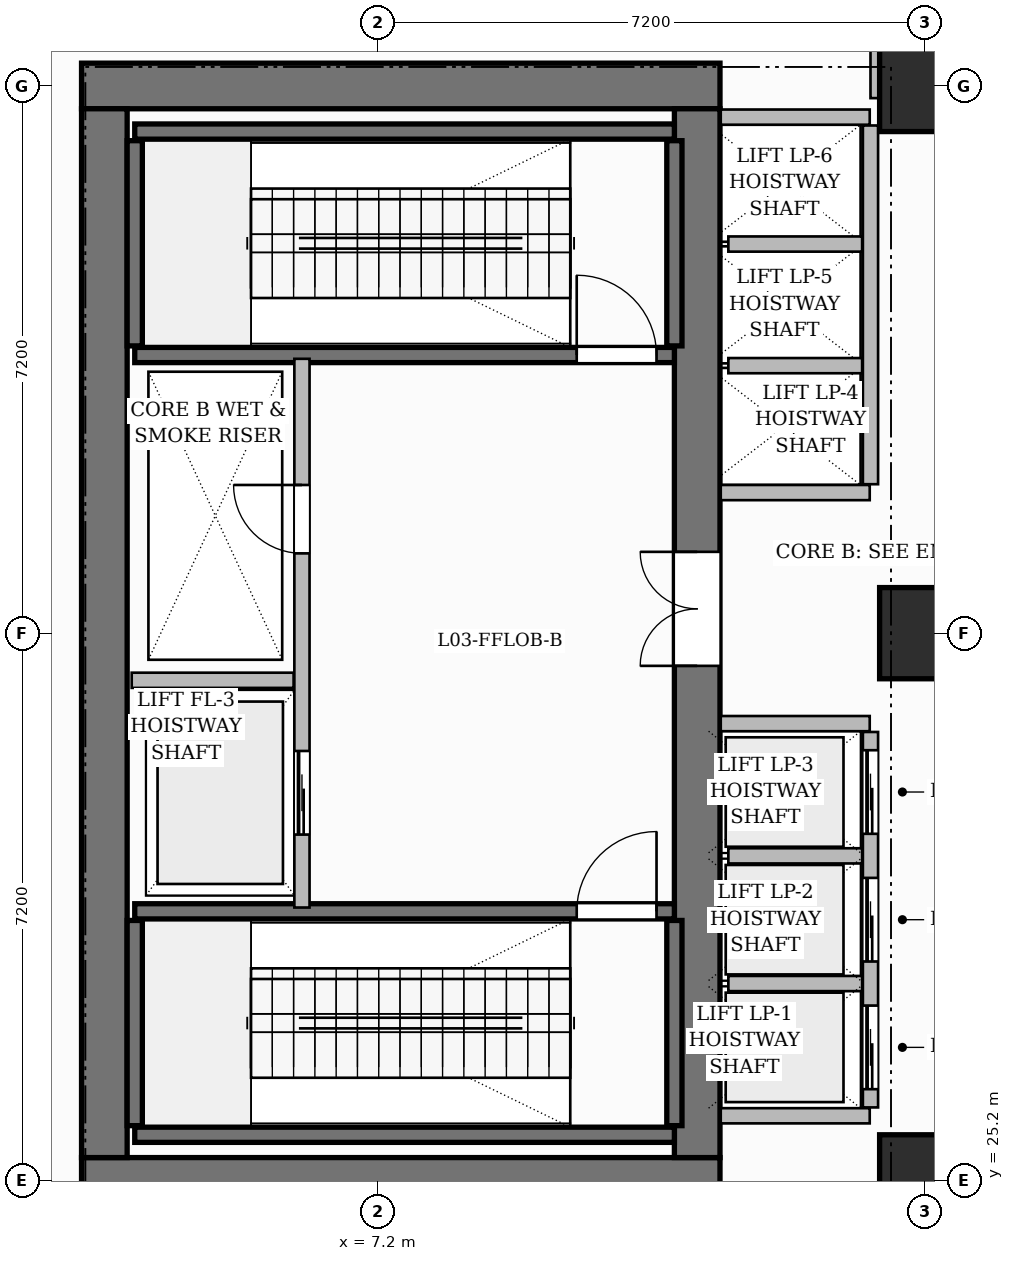
"""IFC4 building model, lengths in metres.
Left out: names, types, materials, properties, quantities, classifications, styles, units other than length and angle.
Written with IfcOpenShell. Run it as: python <this file> out.ifc"""

import sys

from ifc_helpers import new_model, si_unit, direction, frame, frame_2d, origin, origin_2d, place, context, subcontext, project, spatial, rectangle, extrude, source, transform, mapped, element, fill, save


model = new_model("IFC4")
c1 = context("Model", 3, precision=1e-05, world=origin(), true_north=direction((0.0, 1.0)))
c2 = subcontext(c1, "Body", "Model", "MODEL_VIEW")
j1 = project(units=[si_unit("LENGTHUNIT", "METRE"), si_unit("PLANEANGLEUNIT", "RADIAN")], contexts=[c1])
p1 = place(None, origin())
s1 = spatial("IfcSite", under=j1, at=p1, CompositionType="ELEMENT")
p2 = place(p1, origin())
s2 = spatial("IfcBuilding", under=s1, at=p2, CompositionType="ELEMENT")
p3 = place(p2, frame((0.0, 0.0, 16.2)))
s3 = spatial("IfcBuildingStorey", under=s2, at=p3, CompositionType="ELEMENT", Elevation=16.2)
for number, where, z_axis, x_axis in (
    (1, (3.3, 25.2, 0.0), (0.0, 0.0, 1.0), (1.0, 0.0, 0.0)),
    (2, (3.3, 39.6, 0.0), (0.0, 0.0, 1.0), (1.0, 0.0, 0.0)),
):
    element("IfcWall", number, at=place(p3, frame(where, z_axis=z_axis, x_axis=x_axis)), inside=s3, PredefinedType="SHEAR", context=c2, shape_type="SweptSolid", body=[
        extrude(rectangle(XDim=8.4, YDim=0.6, at=frame_2d((4.2, 0.0))), origin(), (0.0, 0.0, 1.0), 5.4),
    ])
p4 = place(p3, frame((3.6, 25.5, 0.0), z_axis=(0.0, 0.0, 1.0), x_axis=(0.0, 1.0, 0.0)))
e3 = element("IfcWall", 3, at=p4, inside=s3, PredefinedType="SHEAR", context=c2, shape_type="SweptSolid", body=[
    extrude(rectangle(XDim=13.8, YDim=0.6, at=frame_2d((6.9, 0.0))), origin(), (0.0, 0.0, 1.0), 5.4),
])
p5 = place(p3, frame((11.4, 25.5, 0.0), z_axis=(0.0, 0.0, 1.0), x_axis=(0.0, 1.0, 0.0)))
e4 = element("IfcWall", 4, at=p5, inside=s3, PredefinedType="SHEAR", context=c2, shape_type="SweptSolid", body=[
    extrude(rectangle(XDim=13.8, YDim=0.6, at=frame_2d((6.9, 0.0))), origin(), (0.0, 0.0, 1.0), 5.4),
])
p6 = place(p5, frame((6.47, 0.0, 0.0)))
e5 = element("IfcOpeningElement", 5, at=p6, cuts=e4, PredefinedType="OPENING", context=c2, shape_type="SweptSolid", body=[
    extrude(rectangle(XDim=1.5, YDim=2.2, at=frame_2d((0.75, 1.1))), frame((0.0, 0.31, 0.0), z_axis=(0.0, -1.0, 0.0), x_axis=(1.0, 0.0, 0.0)), (0.0, 0.0, 1.0), 0.62),
])
m1 = source(origin(), c2, "Body", "SweptSolid", [
    extrude(rectangle(XDim=1.2, YDim=1.2, at=origin_2d()), origin(), (0.0, 0.0, 1.0), 5.4),
])
for number, where, z_axis, x_axis in (
    (6, (14.4, 25.2, 0.0), (0.0, 0.0, 1.0), (1.0, 0.0, 0.0)),
    (7, (14.4, 32.4, 0.0), (0.0, 0.0, 1.0), (1.0, 0.0, 0.0)),
    (8, (14.4, 39.6, 0.0), (0.0, 0.0, 1.0), (1.0, 0.0, 0.0)),
):
    element("IfcColumn", number, at=place(p3, frame(where, z_axis=z_axis, x_axis=x_axis)), inside=s3, PredefinedType="COLUMN", context=c2, shape_type="MappedRepresentation", body=[
        mapped(m1, transform((0.0, 0.0, 0.0), scale=1.0)),
    ])
p7 = place(p3, frame((4.0, 25.8, 0.0), z_axis=(0.0, 0.0, 1.0), x_axis=(1.0, 0.0, 0.0)))
e9 = element("IfcWall", 9, at=p7, inside=s3, PredefinedType="SHEAR", context=c2, shape_type="SweptSolid", body=[
    extrude(rectangle(XDim=7.1, YDim=0.2, at=frame_2d((3.55, 0.0))), origin(), (0.0, 0.0, 1.0), 5.4),
])
for number, where, z_axis, x_axis in (
    (10, (4.0, 25.92, 0.0), (0.0, 0.0, 1.0), (0.0, 1.0, 0.0)),
    (11, (11.1, 25.92, 0.0), (0.0, 0.0, 1.0), (0.0, 1.0, 0.0)),
):
    element("IfcWall", number, at=place(p3, frame(where, z_axis=z_axis, x_axis=x_axis)), inside=s3, PredefinedType="SHEAR", context=c2, shape_type="SweptSolid", body=[
        extrude(rectangle(XDim=2.7, YDim=0.2, at=frame_2d((1.35, 0.0))), origin(), (0.0, 0.0, 1.0), 5.4),
    ])
p8 = place(p3, frame((4.0, 28.74, 0.0), z_axis=(0.0, 0.0, 1.0), x_axis=(1.0, 0.0, 0.0)))
e12 = element("IfcWall", 12, at=p8, inside=s3, PredefinedType="SHEAR", context=c2, shape_type="SweptSolid", body=[
    extrude(rectangle(XDim=7.1, YDim=0.2, at=frame_2d((3.55, 0.0))), origin(), (0.0, 0.0, 1.0), 5.4),
])
p9 = place(p8, frame((5.815, 0.0, 0.0)))
e13 = element("IfcOpeningElement", 13, at=p9, cuts=e12, PredefinedType="OPENING", context=c2, shape_type="SweptSolid", body=[
    extrude(rectangle(XDim=1.05, YDim=2.2, at=frame_2d((0.525, 1.1))), frame((0.0, 0.11, 0.0), z_axis=(0.0, -1.0, 0.0), x_axis=(1.0, 0.0, 0.0)), (0.0, 0.0, 1.0), 0.22),
])
p10 = place(p3, frame((4.0, 39.0, 0.0), z_axis=(0.0, 0.0, 1.0), x_axis=(1.0, 0.0, 0.0)))
e14 = element("IfcWall", 14, at=p10, inside=s3, PredefinedType="SHEAR", context=c2, shape_type="SweptSolid", body=[
    extrude(rectangle(XDim=7.1, YDim=0.2, at=frame_2d((3.55, 0.0))), origin(), (0.0, 0.0, 1.0), 5.4),
])
for number, where, z_axis, x_axis in (
    (15, (4.0, 36.18, 0.0), (0.0, 0.0, 1.0), (0.0, 1.0, 0.0)),
    (16, (11.1, 36.18, 0.0), (0.0, 0.0, 1.0), (0.0, 1.0, 0.0)),
):
    element("IfcWall", number, at=place(p3, frame(where, z_axis=z_axis, x_axis=x_axis)), inside=s3, PredefinedType="SHEAR", context=c2, shape_type="SweptSolid", body=[
        extrude(rectangle(XDim=2.7, YDim=0.2, at=frame_2d((1.35, 0.0))), origin(), (0.0, 0.0, 1.0), 5.4),
    ])
p11 = place(p3, frame((4.0, 36.06, 0.0), z_axis=(0.0, 0.0, 1.0), x_axis=(1.0, 0.0, 0.0)))
e17 = element("IfcWall", 17, at=p11, inside=s3, PredefinedType="SHEAR", context=c2, shape_type="SweptSolid", body=[
    extrude(rectangle(XDim=7.1, YDim=0.2, at=frame_2d((3.55, 0.0))), origin(), (0.0, 0.0, 1.0), 5.4),
])
p12 = place(p11, frame((5.815, 0.0, 0.0)))
e18 = element("IfcOpeningElement", 18, at=p12, cuts=e17, PredefinedType="OPENING", context=c2, shape_type="SweptSolid", body=[
    extrude(rectangle(XDim=1.05, YDim=2.2, at=frame_2d((0.525, 1.1))), frame((0.0, 0.11, 0.0), z_axis=(0.0, -1.0, 0.0), x_axis=(1.0, 0.0, 0.0)), (0.0, 0.0, 1.0), 0.22),
])
p13 = place(p3, frame((6.2, 28.79, 0.0), z_axis=(0.0, 0.0, 1.0), x_axis=(0.0, 1.0, 0.0)))
e19 = element("IfcWall", 19, at=p13, inside=s3, PredefinedType="PARTITIONING", context=c2, shape_type="SweptSolid", body=[
    extrude(rectangle(XDim=7.22, YDim=0.2, at=frame_2d((3.61, 0.0))), origin(), (0.0, 0.0, 1.0), 5.1),
])
p14 = place(p13, frame((4.66, 0.0, 0.0)))
e20 = element("IfcOpeningElement", 20, at=p14, cuts=e19, PredefinedType="OPENING", context=c2, shape_type="SweptSolid", body=[
    extrude(rectangle(XDim=0.9, YDim=2.1, at=frame_2d((0.45, 1.05))), frame((0.0, 0.11, 0.0), z_axis=(0.0, -1.0, 0.0), x_axis=(1.0, 0.0, 0.0)), (0.0, 0.0, 1.0), 0.22),
])
p15 = place(p13, frame((0.96, 0.0, 0.0)))
e21 = element("IfcOpeningElement", 21, at=p15, cuts=e19, PredefinedType="OPENING", context=c2, shape_type="SweptSolid", body=[
    extrude(rectangle(XDim=1.1, YDim=2.2, at=frame_2d((0.55, 1.1))), frame((0.0, 0.11, 0.0), z_axis=(0.0, -1.0, 0.0), x_axis=(1.0, 0.0, 0.0)), (0.0, 0.0, 1.0), 0.22),
])
p16 = place(p3, frame((3.96, 31.78, 0.0), z_axis=(0.0, 0.0, 1.0), x_axis=(1.0, 0.0, 0.0)))
e22 = element("IfcWall", 22, at=p16, inside=s3, PredefinedType="PARTITIONING", context=c2, shape_type="SweptSolid", body=[
    extrude(rectangle(XDim=2.13, YDim=0.2, at=frame_2d((1.065, 0.0))), origin(), (0.0, 0.0, 1.0), 5.1),
])
for number, where, z_axis, x_axis in (
    (23, (11.71, 26.05, 0.0), (0.0, 0.0, 1.0), (1.0, 0.0, 0.0)),
    (24, (11.71, 31.21, 0.0), (0.0, 0.0, 1.0), (1.0, 0.0, 0.0)),
):
    element("IfcWall", number, at=place(p3, frame(where, z_axis=z_axis, x_axis=x_axis)), inside=s3, PredefinedType="PARTITIONING", context=c2, shape_type="SweptSolid", body=[
        extrude(rectangle(XDim=1.96, YDim=0.2, at=frame_2d((0.98, 0.0))), origin(), (0.0, 0.0, 1.0), 5.1),
    ])
p17 = place(p3, frame((13.68, 26.16, 0.0), z_axis=(0.0, 0.0, 1.0), x_axis=(0.0, 1.0, 0.0)))
e25 = element("IfcWall", 25, at=p17, inside=s3, PredefinedType="PARTITIONING", context=c2, shape_type="SweptSolid", body=[
    extrude(rectangle(XDim=4.94, YDim=0.2, at=frame_2d((2.47, 0.0))), origin(), (0.0, 0.0, 1.0), 5.1),
])
p18 = place(p17, frame((0.24, 0.0, 0.0)))
e26 = element("IfcOpeningElement", 26, at=p18, cuts=e25, PredefinedType="OPENING", context=c2, shape_type="SweptSolid", body=[
    extrude(rectangle(XDim=1.1, YDim=2.2, at=frame_2d((0.55, 1.1))), frame((0.0, 0.11, 0.0), z_axis=(0.0, -1.0, 0.0), x_axis=(1.0, 0.0, 0.0)), (0.0, 0.0, 1.0), 0.22),
])
p19 = place(p17, frame((1.92, 0.0, 0.0)))
e27 = element("IfcOpeningElement", 27, at=p19, cuts=e25, PredefinedType="OPENING", context=c2, shape_type="SweptSolid", body=[
    extrude(rectangle(XDim=1.1, YDim=2.2, at=frame_2d((0.55, 1.1))), frame((0.0, 0.11, 0.0), z_axis=(0.0, -1.0, 0.0), x_axis=(1.0, 0.0, 0.0)), (0.0, 0.0, 1.0), 0.22),
])
p20 = place(p17, frame((3.6, 0.0, 0.0)))
e28 = element("IfcOpeningElement", 28, at=p20, cuts=e25, PredefinedType="OPENING", context=c2, shape_type="SweptSolid", body=[
    extrude(rectangle(XDim=1.1, YDim=2.2, at=frame_2d((0.55, 1.1))), frame((0.0, 0.11, 0.0), z_axis=(0.0, -1.0, 0.0), x_axis=(1.0, 0.0, 0.0)), (0.0, 0.0, 1.0), 0.22),
])
for number, where, z_axis, x_axis in (
    (29, (11.81, 27.79, 0.0), (0.0, 0.0, 1.0), (1.0, 0.0, 0.0)),
    (30, (11.81, 29.47, 0.0), (0.0, 0.0, 1.0), (1.0, 0.0, 0.0)),
):
    element("IfcWall", number, at=place(p3, frame(where, z_axis=z_axis, x_axis=x_axis)), inside=s3, PredefinedType="PARTITIONING", context=c2, shape_type="SweptSolid", body=[
        extrude(rectangle(XDim=1.76, YDim=0.2, at=frame_2d((0.88, 0.0))), origin(), (0.0, 0.0, 1.0), 5.1),
    ])
for number, where, z_axis, x_axis in (
    (31, (11.71, 34.25, 0.0), (0.0, 0.0, 1.0), (1.0, 0.0, 0.0)),
    (32, (11.71, 39.19, 0.0), (0.0, 0.0, 1.0), (1.0, 0.0, 0.0)),
):
    element("IfcWall", number, at=place(p3, frame(where, z_axis=z_axis, x_axis=x_axis)), inside=s3, PredefinedType="PARTITIONING", context=c2, shape_type="SweptSolid", body=[
        extrude(rectangle(XDim=1.96, YDim=0.2, at=frame_2d((0.98, 0.0))), origin(), (0.0, 0.0, 1.0), 5.1),
    ])
p21 = place(p3, frame((13.68, 34.36, 0.0), z_axis=(0.0, 0.0, 1.0), x_axis=(0.0, 1.0, 0.0)))
e33 = element("IfcWall", 33, at=p21, inside=s3, PredefinedType="PARTITIONING", context=c2, shape_type="SweptSolid", body=[
    extrude(rectangle(XDim=4.72, YDim=0.2, at=frame_2d((2.36, 0.0))), origin(), (0.0, 0.0, 1.0), 5.1),
])
for number, where, z_axis, x_axis in (
    (34, (11.81, 35.92, 0.0), (0.0, 0.0, 1.0), (1.0, 0.0, 0.0)),
    (35, (11.81, 37.52, 0.0), (0.0, 0.0, 1.0), (1.0, 0.0, 0.0)),
):
    element("IfcWall", number, at=place(p3, frame(where, z_axis=z_axis, x_axis=x_axis)), inside=s3, PredefinedType="PARTITIONING", context=c2, shape_type="SweptSolid", body=[
        extrude(rectangle(XDim=1.76, YDim=0.2, at=frame_2d((0.88, 0.0))), origin(), (0.0, 0.0, 1.0), 5.1),
    ])
p22 = place(p3, frame((13.75, 39.44, 0.0), z_axis=(0.0, 0.0, 1.0), x_axis=(0.0, 1.0, 0.0)))
e36 = element("IfcWall", 36, at=p22, inside=s3, PredefinedType="PARTITIONING", context=c2, shape_type="SweptSolid", body=[
    extrude(rectangle(XDim=7.192, YDim=0.14, at=frame_2d((3.596, 0.0))), origin(), (0.0, 0.0, 1.0), 5.1),
])
p23 = place(p3, frame((13.84, 39.35, 0.0), z_axis=(0.0, 0.0, 1.0), x_axis=(1.0, 0.0, 0.0)))
e37 = element("IfcWall", 37, at=p23, inside=s3, PredefinedType="PARTITIONING", context=c2, shape_type="SweptSolid", body=[
    extrude(rectangle(XDim=58.52, YDim=0.16, at=frame_2d((29.26, 0.0))), origin(), (0.0, 0.0, 1.0), 4.185),
])
p24 = place(p23, frame((10.535, 0.0, 0.0)))
e38 = element("IfcOpeningElement", 38, at=p24, cuts=e37, PredefinedType="OPENING", context=c2, shape_type="SweptSolid", body=[
    extrude(rectangle(XDim=1.6, YDim=2.4, at=frame_2d((0.8, 1.2))), frame((0.0, 0.09, 0.0), z_axis=(0.0, -1.0, 0.0), x_axis=(1.0, 0.0, 0.0)), (0.0, 0.0, 1.0), 0.18),
])
p25 = place(p23, frame((30.66, 0.0, 0.0)))
e39 = element("IfcOpeningElement", 39, at=p25, cuts=e37, PredefinedType="OPENING", context=c2, shape_type="SweptSolid", body=[
    extrude(rectangle(XDim=1.6, YDim=2.4, at=frame_2d((0.8, 1.2))), frame((0.0, 0.09, 0.0), z_axis=(0.0, -1.0, 0.0), x_axis=(1.0, 0.0, 0.0)), (0.0, 0.0, 1.0), 0.18),
])
p26 = place(p23, frame((44.235, 0.0, 0.0)))
e40 = element("IfcOpeningElement", 40, at=p26, cuts=e37, PredefinedType="OPENING", context=c2, shape_type="SweptSolid", body=[
    extrude(rectangle(XDim=0.85, YDim=2.1, at=frame_2d((0.425, 1.05))), frame((0.0, 0.09, 0.0), z_axis=(0.0, -1.0, 0.0), x_axis=(1.0, 0.0, 0.0)), (0.0, 0.0, 1.0), 0.18),
])
p27 = place(p23, frame((50.335, 0.0, 0.0)))
e41 = element("IfcOpeningElement", 41, at=p27, cuts=e37, PredefinedType="OPENING", context=c2, shape_type="SweptSolid", body=[
    extrude(rectangle(XDim=0.85, YDim=2.1, at=frame_2d((0.425, 1.05))), frame((0.0, 0.09, 0.0), z_axis=(0.0, -1.0, 0.0), x_axis=(1.0, 0.0, 0.0)), (0.0, 0.0, 1.0), 0.18),
])
p28 = place(p23, frame((54.685, 0.0, 0.0)))
e42 = element("IfcOpeningElement", 42, at=p28, cuts=e37, PredefinedType="OPENING", context=c2, shape_type="SweptSolid", body=[
    extrude(rectangle(XDim=1.6, YDim=2.4, at=frame_2d((0.8, 1.2))), frame((0.0, 0.09, 0.0), z_axis=(0.0, -1.0, 0.0), x_axis=(1.0, 0.0, 0.0)), (0.0, 0.0, 1.0), 0.18),
])
m2 = source(origin(), c2, "Body", "SweptSolid", [
    extrude(rectangle(XDim=1.05, YDim=2.2, at=frame_2d((0.525, 1.1))), frame((0.0, 0.025, 0.0), z_axis=(0.0, -1.0, 0.0), x_axis=(1.0, 0.0, 0.0)), (0.0, 0.0, 1.0), 0.05),
])
p29 = place(p9, origin())
e43 = element("IfcDoor", 43, at=p29, inside=s3, OperationType="SINGLE_SWING_RIGHT", PredefinedType="DOOR", context=c2, shape_type="MappedRepresentation", body=[
    mapped(m2, transform((0.0, 0.0, 0.0), scale=1.0)),
])
fill(e13, e43)
p30 = place(p12, origin())
e44 = element("IfcDoor", 44, at=p30, inside=s3, OperationType="SINGLE_SWING_LEFT", PredefinedType="DOOR", context=c2, shape_type="MappedRepresentation", body=[
    mapped(m2, transform((0.0, 0.0, 0.0), scale=1.0)),
])
fill(e18, e44)
m3 = source(origin(), c2, "Body", "SweptSolid", [
    extrude(rectangle(XDim=0.9, YDim=2.1, at=frame_2d((0.45, 1.05))), frame((0.0, 0.025, 0.0), z_axis=(0.0, -1.0, 0.0), x_axis=(1.0, 0.0, 0.0)), (0.0, 0.0, 1.0), 0.05),
])
p31 = place(p14, origin())
e45 = element("IfcDoor", 45, at=p31, inside=s3, OperationType="SINGLE_SWING_RIGHT", PredefinedType="DOOR", context=c2, shape_type="MappedRepresentation", body=[
    mapped(m3, transform((0.0, 0.0, 0.0), scale=1.0)),
])
fill(e20, e45)
m4 = source(origin(), c2, "Body", "SweptSolid", [
    extrude(rectangle(XDim=1.5, YDim=2.2, at=frame_2d((0.75, 1.1))), frame((0.0, 0.025, 0.0), z_axis=(0.0, -1.0, 0.0), x_axis=(1.0, 0.0, 0.0)), (0.0, 0.0, 1.0), 0.05),
])
p32 = place(p6, origin())
e46 = element("IfcDoor", 46, at=p32, inside=s3, OperationType="DOUBLE_DOOR_SINGLE_SWING", PredefinedType="DOOR", context=c2, shape_type="MappedRepresentation", body=[
    mapped(m4, transform((0.0, 0.0, 0.0), scale=1.0)),
])
fill(e5, e46)
m5 = source(origin(), c2, "Body", "SweptSolid", [
    extrude(rectangle(XDim=1.1, YDim=2.2, at=frame_2d((0.55, 1.1))), frame((0.0, 0.025, 0.0), z_axis=(0.0, -1.0, 0.0), x_axis=(1.0, 0.0, 0.0)), (0.0, 0.0, 1.0), 0.05),
])
p33 = place(p15, origin())
e47 = element("IfcDoor", 47, at=p33, inside=s3, OperationType="SLIDING_TO_LEFT", PredefinedType="DOOR", context=c2, shape_type="MappedRepresentation", body=[
    mapped(m5, transform((0.0, 0.0, 0.0), scale=1.0)),
])
fill(e21, e47)
p34 = place(p18, origin())
e48 = element("IfcDoor", 48, at=p34, inside=s3, OperationType="SLIDING_TO_LEFT", PredefinedType="DOOR", context=c2, shape_type="MappedRepresentation", body=[
    mapped(m5, transform((0.0, 0.0, 0.0), scale=1.0)),
])
fill(e26, e48)
p35 = place(p19, origin())
e49 = element("IfcDoor", 49, at=p35, inside=s3, OperationType="SLIDING_TO_LEFT", PredefinedType="DOOR", context=c2, shape_type="MappedRepresentation", body=[
    mapped(m5, transform((0.0, 0.0, 0.0), scale=1.0)),
])
fill(e27, e49)
p36 = place(p20, origin())
e50 = element("IfcDoor", 50, at=p36, inside=s3, OperationType="SLIDING_TO_LEFT", PredefinedType="DOOR", context=c2, shape_type="MappedRepresentation", body=[
    mapped(m5, transform((0.0, 0.0, 0.0), scale=1.0)),
])
fill(e28, e50)
save(model, sys.argv[1])
